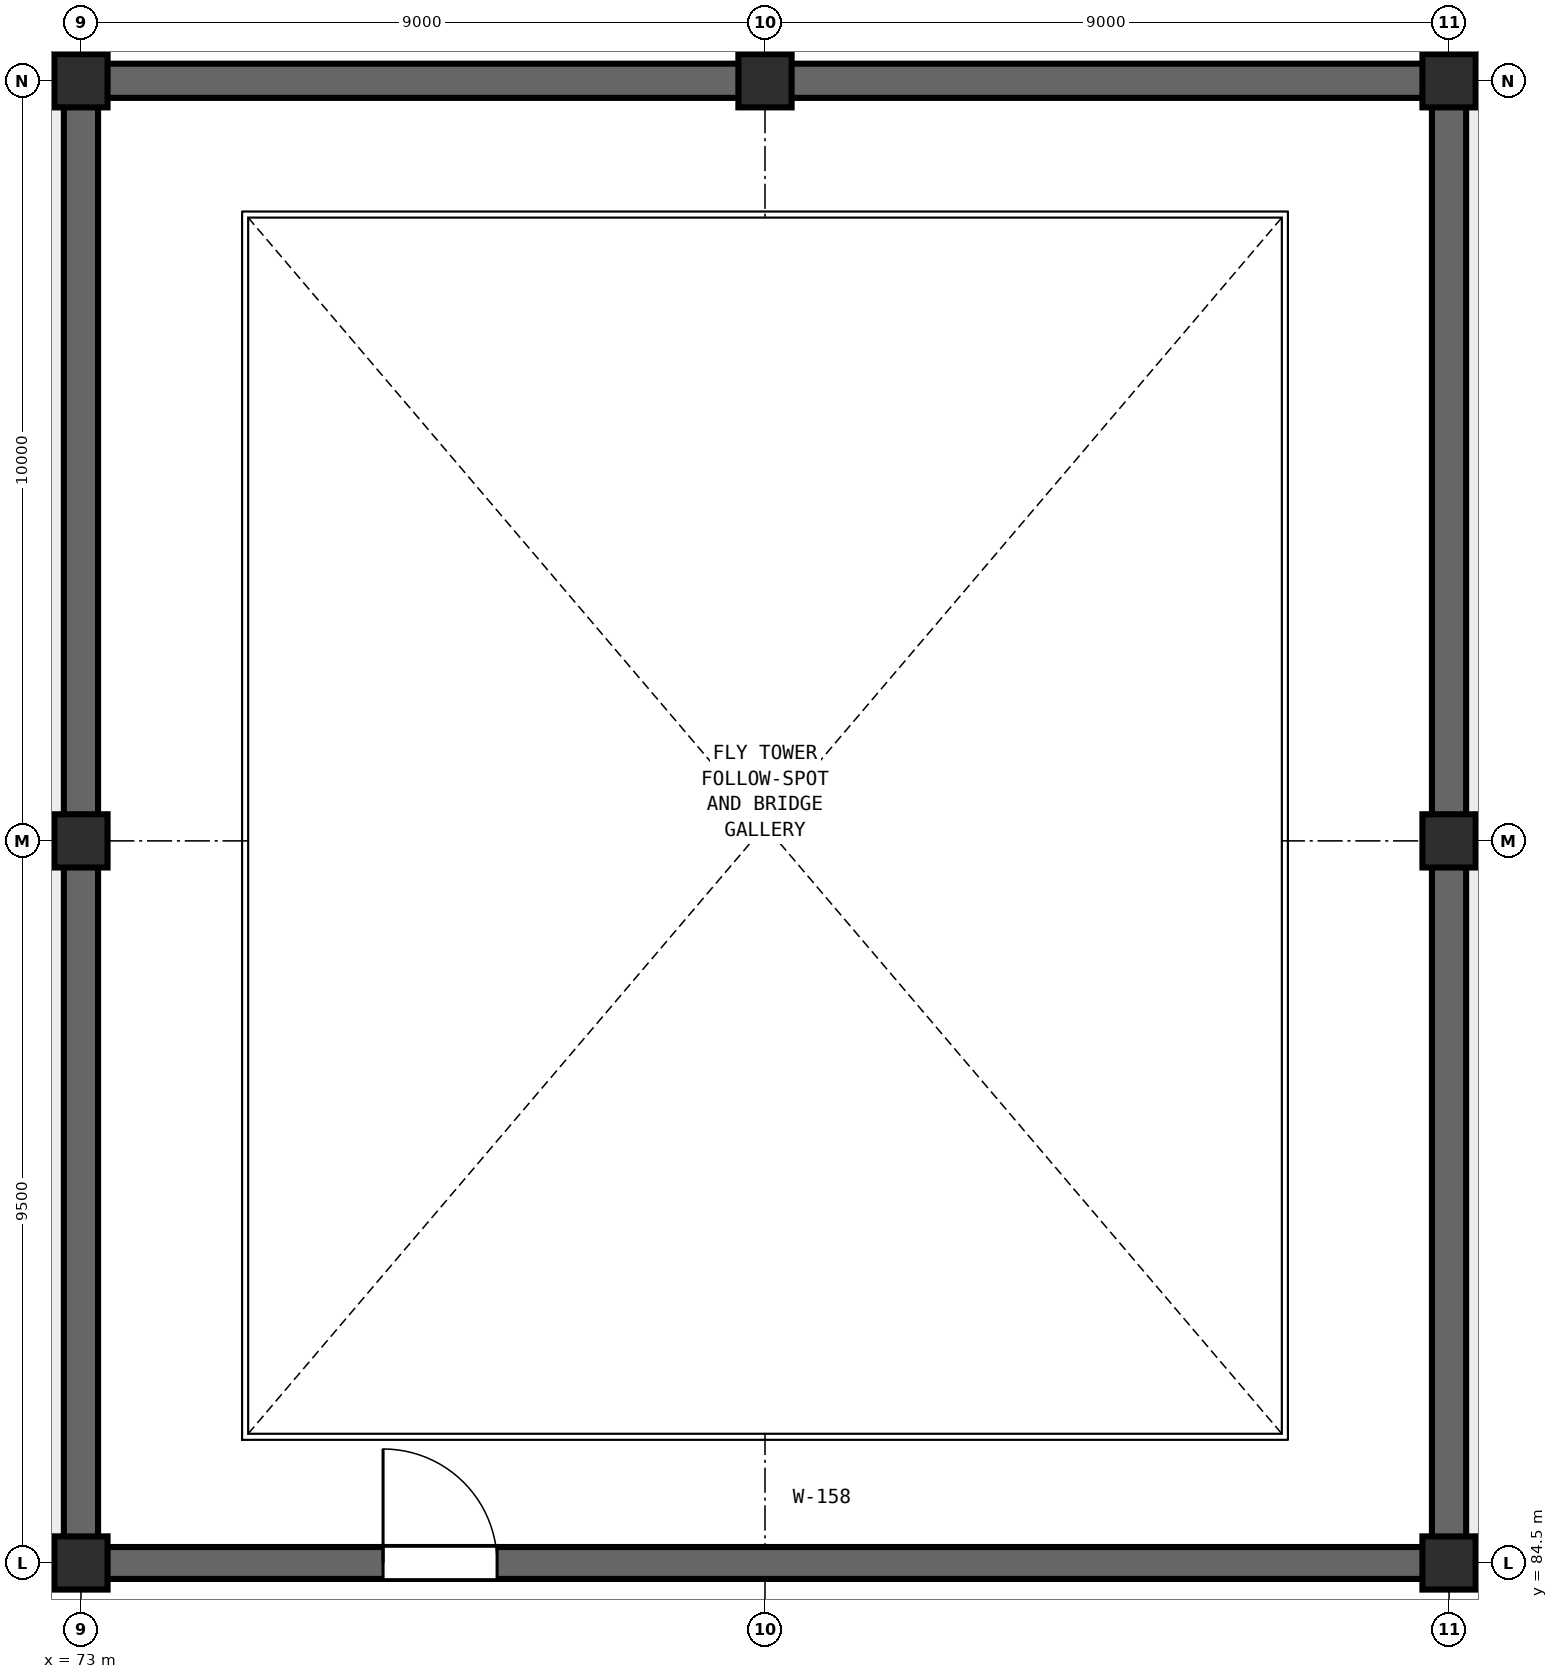
"""IFC4 building model, lengths in metres.
Left out: names, types, materials, properties, quantities, classifications, styles, units other than length and angle.
Written with IfcOpenShell. Run it as: python <this file> out.ifc"""

import sys

from ifc_helpers import new_model, si_unit, direction, frame, frame_2d, origin, origin_2d, place, context, subcontext, project, spatial, rectangle, extrude, element, fill, save


model = new_model("IFC4")
c1 = context("Model", 3, precision=1e-05, world=origin(), true_north=direction((0.0, 1.0)))
c2 = subcontext(c1, "Body", "Model", "MODEL_VIEW")
j1 = project(units=[si_unit("LENGTHUNIT", "METRE"), si_unit("PLANEANGLEUNIT", "RADIAN")], contexts=[c1])
p1 = place(None, origin())
s1 = spatial("IfcSite", under=j1, at=p1, CompositionType="ELEMENT")
p2 = place(p1, origin())
s2 = spatial("IfcBuilding", under=s1, at=p2, CompositionType="ELEMENT")
p3 = place(p2, frame((0.0, 0.0, 14.7)))
s3 = spatial("IfcBuildingStorey", under=s2, at=p3, CompositionType="ELEMENT", Elevation=14.7)
for number, where, z_axis, x_axis in (
    (1, (73.0, 84.5, 0.0), (0.0, 0.0, 1.0), (1.0, 0.0, 0.0)),
    (2, (73.0, 94.0, 0.0), (0.0, 0.0, 1.0), (1.0, 0.0, 0.0)),
    (3, (73.0, 104.0, 0.0), (0.0, 0.0, 1.0), (1.0, 0.0, 0.0)),
    (4, (82.0, 104.0, 0.0), (0.0, 0.0, 1.0), (1.0, 0.0, 0.0)),
    (5, (91.0, 84.5, 0.0), (0.0, 0.0, 1.0), (1.0, 0.0, 0.0)),
    (6, (91.0, 94.0, 0.0), (0.0, 0.0, 1.0), (1.0, 0.0, 0.0)),
    (7, (91.0, 104.0, 0.0), (0.0, 0.0, 1.0), (1.0, 0.0, 0.0)),
):
    element("IfcColumn", number, at=place(p3, frame(where, z_axis=z_axis, x_axis=x_axis)), inside=s3, PredefinedType="COLUMN", context=c2, shape_type="SweptSolid", body=[
        extrude(rectangle(XDim=0.7, YDim=0.7, at=origin_2d()), origin(), (0.0, 0.0, 1.0), 4.25),
    ])
p4 = place(p3, frame((72.775, 104.0, 0.0), z_axis=(0.0, 0.0, 1.0), x_axis=(1.0, 0.0, 0.0)))
e8 = element("IfcWall", 8, at=p4, inside=s3, PredefinedType="SHEAR", context=c2, shape_type="SweptSolid", body=[
    extrude(rectangle(XDim=18.45, YDim=0.45, at=frame_2d((9.225, 0.0))), origin(), (0.0, 0.0, 1.0), 4.5),
])
p5 = place(p3, frame((72.775, 84.5, 0.0), z_axis=(0.0, 0.0, 1.0), x_axis=(1.0, 0.0, 0.0)))
e9 = element("IfcWall", 9, at=p5, inside=s3, PredefinedType="SHEAR", context=c2, shape_type="SweptSolid", body=[
    extrude(rectangle(XDim=18.45, YDim=0.42, at=frame_2d((9.225, 0.0))), origin(), (0.0, 0.0, 1.0), 4.5),
])
p6 = place(p5, frame((4.2, 0.0, 0.0)))
e10 = element("IfcOpeningElement", 10, at=p6, cuts=e9, PredefinedType="OPENING", context=c2, shape_type="SweptSolid", body=[
    extrude(rectangle(XDim=1.5, YDim=2.2, at=frame_2d((0.75, 1.1))), frame((0.0, 0.22, 0.0), z_axis=(0.0, -1.0, 0.0), x_axis=(1.0, 0.0, 0.0)), (0.0, 0.0, 1.0), 0.44),
])
for number, where, z_axis, x_axis in (
    (11, (73.0, 84.275, 0.0), (0.0, 0.0, 1.0), (0.0, 1.0, 0.0)),
    (12, (91.0, 84.275, 0.0), (0.0, 0.0, 1.0), (0.0, 1.0, 0.0)),
):
    element("IfcWall", number, at=place(p3, frame(where, z_axis=z_axis, x_axis=x_axis)), inside=s3, PredefinedType="SHEAR", context=c2, shape_type="SweptSolid", body=[
        extrude(rectangle(XDim=19.95, YDim=0.45, at=frame_2d((9.975, 0.0))), origin(), (0.0, 0.0, 1.0), 4.5),
    ])
p7 = place(p6, origin())
e13 = element("IfcDoor", 13, at=p7, inside=s3, OperationType="SINGLE_SWING_LEFT", PredefinedType="DOOR", context=c2, shape_type="SweptSolid", body=[
    extrude(rectangle(XDim=1.5, YDim=2.2, at=frame_2d((0.75, 1.1))), frame((0.0, 0.025, 0.0), z_axis=(0.0, -1.0, 0.0), x_axis=(1.0, 0.0, 0.0)), (0.0, 0.0, 1.0), 0.05),
])
fill(e10, e13)
save(model, sys.argv[1])
